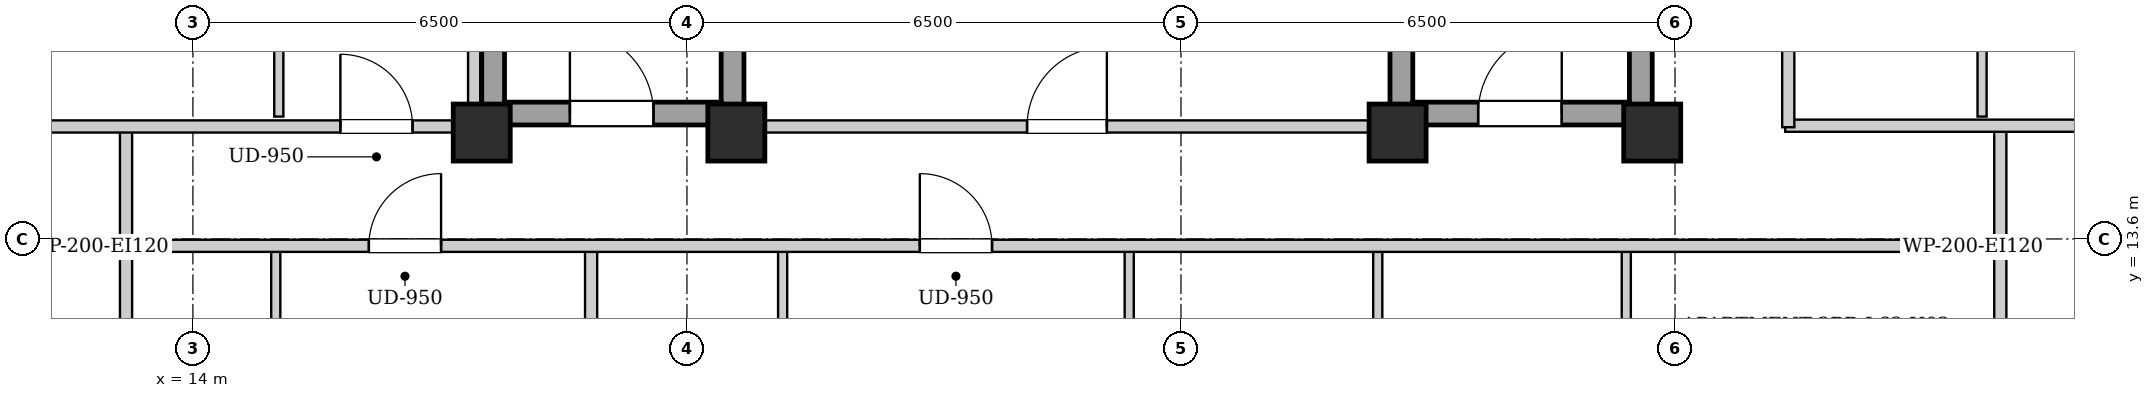
"""IFC4 building model, lengths in metres.
Left out: names, types, materials, properties, quantities, classifications, styles, units other than length and angle.
Written with IfcOpenShell. Run it as: python <this file> out.ifc"""

import sys

from ifc_helpers import new_model, si_unit, direction, frame, frame_2d, origin, origin_2d, place, context, subcontext, project, spatial, rectangle, extrude, element, fill, save


model = new_model("IFC4")
c1 = context("Model", 3, precision=1e-05, world=origin(), true_north=direction((0.0, 1.0)))
c2 = subcontext(c1, "Body", "Model", "MODEL_VIEW")
j1 = project(units=[si_unit("LENGTHUNIT", "METRE"), si_unit("PLANEANGLEUNIT", "RADIAN")], contexts=[c1])
p1 = place(None, origin())
s1 = spatial("IfcSite", under=j1, at=p1, CompositionType="ELEMENT")
p2 = place(p1, origin())
s2 = spatial("IfcBuilding", under=s1, at=p2, CompositionType="ELEMENT")
p3 = place(p2, frame((0.0, 0.0, 217.3)))
s3 = spatial("IfcBuildingStorey", under=s2, at=p3, CompositionType="ELEMENT", Elevation=217.3)
for number, where, z_axis, x_axis in (
    (1, (17.8, 15.0, 0.0), (0.0, 0.0, 1.0), (1.0, 0.0, 0.0)),
    (2, (21.15, 15.0, 0.0), (0.0, 0.0, 1.0), (1.0, 0.0, 0.0)),
    (3, (29.85, 15.0, 0.0), (0.0, 0.0, 1.0), (1.0, 0.0, 0.0)),
    (4, (33.2, 15.0, 0.0), (0.0, 0.0, 1.0), (1.0, 0.0, 0.0)),
):
    element("IfcColumn", number, at=place(p3, frame(where, z_axis=z_axis, x_axis=x_axis)), inside=s3, PredefinedType="COLUMN", context=c2, shape_type="SweptSolid", body=[
        extrude(rectangle(XDim=0.75, YDim=0.75, at=origin_2d()), origin(), (0.0, 0.0, 1.0), 3.4),
    ])
for number, where, z_axis, x_axis in (
    (5, (17.95, 15.1, 0.0), (0.0, 0.0, 1.0), (0.0, 1.0, 0.0)),
    (6, (21.1, 15.1, 0.0), (0.0, 0.0, 1.0), (0.0, 1.0, 0.0)),
):
    element("IfcWall", number, at=place(p3, frame(where, z_axis=z_axis, x_axis=x_axis)), inside=s3, PredefinedType="SHEAR", context=c2, shape_type="SweptSolid", body=[
        extrude(rectangle(XDim=9.0, YDim=0.3, at=frame_2d((4.5, 0.0))), origin(), (0.0, 0.0, 1.0), 3.14),
    ])
p4 = place(p3, frame((18.1, 15.25, 0.0), z_axis=(0.0, 0.0, 1.0), x_axis=(1.0, 0.0, 0.0)))
e7 = element("IfcWall", 7, at=p4, inside=s3, PredefinedType="SHEAR", context=c2, shape_type="SweptSolid", body=[
    extrude(rectangle(XDim=2.85, YDim=0.3, at=frame_2d((1.425, 0.0))), origin(), (0.0, 0.0, 1.0), 3.14),
])
p5 = place(p4, frame((0.86, 0.0, 0.0)))
e8 = element("IfcOpeningElement", 8, at=p5, cuts=e7, PredefinedType="OPENING", context=c2, shape_type="SweptSolid", body=[
    extrude(rectangle(XDim=1.1, YDim=2.05, at=frame_2d((0.55, 1.025))), frame((0.0, 0.16, 0.0), z_axis=(0.0, -1.0, 0.0), x_axis=(1.0, 0.0, 0.0)), (0.0, 0.0, 1.0), 0.32),
])
for number, where, z_axis, x_axis in (
    (9, (29.9, 15.1, 0.0), (0.0, 0.0, 1.0), (0.0, 1.0, 0.0)),
    (10, (33.05, 15.1, 0.0), (0.0, 0.0, 1.0), (0.0, 1.0, 0.0)),
):
    element("IfcWall", number, at=place(p3, frame(where, z_axis=z_axis, x_axis=x_axis)), inside=s3, PredefinedType="SHEAR", context=c2, shape_type="SweptSolid", body=[
        extrude(rectangle(XDim=9.0, YDim=0.3, at=frame_2d((4.5, 0.0))), origin(), (0.0, 0.0, 1.0), 3.14),
    ])
p6 = place(p3, frame((30.05, 15.25, 0.0), z_axis=(0.0, 0.0, 1.0), x_axis=(1.0, 0.0, 0.0)))
e11 = element("IfcWall", 11, at=p6, inside=s3, PredefinedType="SHEAR", context=c2, shape_type="SweptSolid", body=[
    extrude(rectangle(XDim=2.85, YDim=0.3, at=frame_2d((1.425, 0.0))), origin(), (0.0, 0.0, 1.0), 3.14),
])
p7 = place(p6, frame((0.86, 0.0, 0.0)))
e12 = element("IfcOpeningElement", 12, at=p7, cuts=e11, PredefinedType="OPENING", context=c2, shape_type="SweptSolid", body=[
    extrude(rectangle(XDim=1.1, YDim=2.05, at=frame_2d((0.55, 1.025))), frame((0.0, 0.16, 0.0), z_axis=(0.0, -1.0, 0.0), x_axis=(1.0, 0.0, 0.0)), (0.0, 0.0, 1.0), 0.32),
])
p8 = place(p3, frame((21.25, 15.08, 0.0), z_axis=(0.0, 0.0, 1.0), x_axis=(1.0, 0.0, 0.0)))
e13 = element("IfcWall", 13, at=p8, inside=s3, PredefinedType="PARTITIONING", context=c2, shape_type="SweptSolid", body=[
    extrude(rectangle(XDim=8.5, YDim=0.16, at=frame_2d((4.25, 0.0))), origin(), (0.0, 0.0, 1.0), 2.668),
])
p9 = place(p8, frame((3.725, 0.0, 0.0)))
e14 = element("IfcOpeningElement", 14, at=p9, cuts=e13, PredefinedType="OPENING", context=c2, shape_type="SweptSolid", body=[
    extrude(rectangle(XDim=1.05, YDim=2.05, at=frame_2d((0.525, 1.025))), frame((0.0, 0.09, 0.0), z_axis=(0.0, -1.0, 0.0), x_axis=(1.0, 0.0, 0.0)), (0.0, 0.0, 1.0), 0.18),
])
for number, where, z_axis, x_axis in (
    (15, (13.12, 13.51, 0.0), (0.0, 0.0, 1.0), (0.0, 1.0, 0.0)),
    (16, (37.78, 13.51, 0.0), (0.0, 0.0, 1.0), (0.0, 1.0, 0.0)),
):
    element("IfcWall", number, at=place(p3, frame(where, z_axis=z_axis, x_axis=x_axis)), inside=s3, PredefinedType="PARTITIONING", context=c2, shape_type="SweptSolid", body=[
        extrude(rectangle(XDim=1.58, YDim=0.16, at=frame_2d((0.79, 0.0))), origin(), (0.0, 0.0, 1.0), 3.14),
    ])
p10 = place(p3, frame((34.95, 15.09, 0.0), z_axis=(0.0, 0.0, 1.0), x_axis=(1.0, 0.0, 0.0)))
e17 = element("IfcWall", 17, at=p10, inside=s3, PredefinedType="PARTITIONING", context=c2, shape_type="SweptSolid", body=[
    extrude(rectangle(XDim=5.07, YDim=0.16, at=frame_2d((2.535, 0.0))), origin(), (0.0, 0.0, 1.0), 2.668),
])
p11 = place(p3, frame((13.12, 10.56, 0.0), z_axis=(0.0, 0.0, 1.0), x_axis=(0.0, 1.0, 0.0)))
e18 = element("IfcWall", 18, at=p11, inside=s3, PredefinedType="PARTITIONING", context=c2, shape_type="SweptSolid", body=[
    extrude(rectangle(XDim=2.91, YDim=0.16, at=frame_2d((1.455, 0.0))), origin(), (0.0, 0.0, 1.0), 3.14),
])
p12 = place(p3, frame((15.09, 10.62, 0.0), z_axis=(0.0, 0.0, 1.0), x_axis=(0.0, 1.0, 0.0)))
e19 = element("IfcWall", 19, at=p12, inside=s3, PredefinedType="PARTITIONING", context=c2, shape_type="SweptSolid", body=[
    extrude(rectangle(XDim=2.85, YDim=0.12, at=frame_2d((1.425, 0.0))), origin(), (0.0, 0.0, 1.0), 3.14),
])
p13 = place(p12, frame((0.995, 0.0, 0.0)))
e20 = element("IfcOpeningElement", 20, at=p13, cuts=e19, PredefinedType="OPENING", context=c2, shape_type="SweptSolid", body=[
    extrude(rectangle(XDim=0.86, YDim=2.05, at=frame_2d((0.43, 1.025))), frame((0.0, 0.07, 0.0), z_axis=(0.0, -1.0, 0.0), x_axis=(1.0, 0.0, 0.0)), (0.0, 0.0, 1.0), 0.14),
])
p14 = place(p3, frame((37.78, 10.56, 0.0), z_axis=(0.0, 0.0, 1.0), x_axis=(0.0, 1.0, 0.0)))
e21 = element("IfcWall", 21, at=p14, inside=s3, PredefinedType="PARTITIONING", context=c2, shape_type="SweptSolid", body=[
    extrude(rectangle(XDim=2.91, YDim=0.16, at=frame_2d((1.455, 0.0))), origin(), (0.0, 0.0, 1.0), 3.14),
])
p15 = place(p3, frame((19.239, 6.06, 0.0), z_axis=(0.0, 0.0, 1.0), x_axis=(0.0, 1.0, 0.0)))
e22 = element("IfcWall", 22, at=p15, inside=s3, PredefinedType="PARTITIONING", context=c2, shape_type="SweptSolid", body=[
    extrude(rectangle(XDim=7.41, YDim=0.16, at=frame_2d((3.705, 0.0))), origin(), (0.0, 0.0, 1.0), 3.14),
])
p16 = place(p3, frame((21.759, 10.62, 0.0), z_axis=(0.0, 0.0, 1.0), x_axis=(0.0, 1.0, 0.0)))
e23 = element("IfcWall", 23, at=p16, inside=s3, PredefinedType="PARTITIONING", context=c2, shape_type="SweptSolid", body=[
    extrude(rectangle(XDim=2.85, YDim=0.12, at=frame_2d((1.425, 0.0))), origin(), (0.0, 0.0, 1.0), 3.14),
])
p17 = place(p16, frame((0.995, 0.0, 0.0)))
e24 = element("IfcOpeningElement", 24, at=p17, cuts=e23, PredefinedType="OPENING", context=c2, shape_type="SweptSolid", body=[
    extrude(rectangle(XDim=0.86, YDim=2.05, at=frame_2d((0.43, 1.025))), frame((0.0, 0.07, 0.0), z_axis=(0.0, -1.0, 0.0), x_axis=(1.0, 0.0, 0.0)), (0.0, 0.0, 1.0), 0.14),
])
p18 = place(p3, frame((26.319, 10.62, 0.0), z_axis=(0.0, 0.0, 1.0), x_axis=(0.0, 1.0, 0.0)))
e25 = element("IfcWall", 25, at=p18, inside=s3, PredefinedType="PARTITIONING", context=c2, shape_type="SweptSolid", body=[
    extrude(rectangle(XDim=2.85, YDim=0.12, at=frame_2d((1.425, 0.0))), origin(), (0.0, 0.0, 1.0), 3.14),
])
p19 = place(p18, frame((0.975, 0.0, 0.0)))
e26 = element("IfcOpeningElement", 26, at=p19, cuts=e25, PredefinedType="OPENING", context=c2, shape_type="SweptSolid", body=[
    extrude(rectangle(XDim=0.9, YDim=2.05, at=frame_2d((0.45, 1.025))), frame((0.0, 0.07, 0.0), z_axis=(0.0, -1.0, 0.0), x_axis=(1.0, 0.0, 0.0)), (0.0, 0.0, 1.0), 0.14),
])
p20 = place(p3, frame((29.589, 10.62, 0.0), z_axis=(0.0, 0.0, 1.0), x_axis=(0.0, 1.0, 0.0)))
e27 = element("IfcWall", 27, at=p20, inside=s3, PredefinedType="PARTITIONING", context=c2, shape_type="SweptSolid", body=[
    extrude(rectangle(XDim=2.85, YDim=0.12, at=frame_2d((1.425, 0.0))), origin(), (0.0, 0.0, 1.0), 3.14),
])
p21 = place(p20, frame((0.975, 0.0, 0.0)))
e28 = element("IfcOpeningElement", 28, at=p21, cuts=e27, PredefinedType="OPENING", context=c2, shape_type="SweptSolid", body=[
    extrude(rectangle(XDim=0.9, YDim=2.05, at=frame_2d((0.45, 1.025))), frame((0.0, 0.07, 0.0), z_axis=(0.0, -1.0, 0.0), x_axis=(1.0, 0.0, 0.0)), (0.0, 0.0, 1.0), 0.14),
])
p22 = place(p3, frame((32.859, 10.62, 0.0), z_axis=(0.0, 0.0, 1.0), x_axis=(0.0, 1.0, 0.0)))
e29 = element("IfcWall", 29, at=p22, inside=s3, PredefinedType="PARTITIONING", context=c2, shape_type="SweptSolid", body=[
    extrude(rectangle(XDim=2.85, YDim=0.12, at=frame_2d((1.425, 0.0))), origin(), (0.0, 0.0, 1.0), 3.14),
])
p23 = place(p22, frame((0.975, 0.0, 0.0)))
e30 = element("IfcOpeningElement", 30, at=p23, cuts=e29, PredefinedType="OPENING", context=c2, shape_type="SweptSolid", body=[
    extrude(rectangle(XDim=0.9, YDim=2.05, at=frame_2d((0.45, 1.025))), frame((0.0, 0.07, 0.0), z_axis=(0.0, -1.0, 0.0), x_axis=(1.0, 0.0, 0.0)), (0.0, 0.0, 1.0), 0.14),
])
p24 = place(p3, frame((10.88, 15.08, 0.0), z_axis=(0.0, 0.0, 1.0), x_axis=(1.0, 0.0, 0.0)))
e31 = element("IfcWall", 31, at=p24, inside=s3, PredefinedType="PARTITIONING", context=c2, shape_type="SweptSolid", body=[
    extrude(rectangle(XDim=6.88, YDim=0.16, at=frame_2d((3.44, 0.0))), origin(), (0.0, 0.0, 1.0), 2.668),
])
p25 = place(p24, frame((5.06, 0.0, 0.0)))
e32 = element("IfcOpeningElement", 32, at=p25, cuts=e31, PredefinedType="OPENING", context=c2, shape_type="SweptSolid", body=[
    extrude(rectangle(XDim=0.95, YDim=2.1, at=frame_2d((0.475, 1.05))), frame((0.0, 0.09, 0.0), z_axis=(0.0, -1.0, 0.0), x_axis=(1.0, 0.0, 0.0)), (0.0, 0.0, 1.0), 0.18),
])
p26 = place(p3, frame((15.13, 15.21, 0.0), z_axis=(0.0, 0.0, 1.0), x_axis=(0.0, 1.0, 0.0)))
e33 = element("IfcWall", 33, at=p26, inside=s3, PredefinedType="PARTITIONING", context=c2, shape_type="SweptSolid", body=[
    extrude(rectangle(XDim=4.308, YDim=0.12, at=frame_2d((2.154, 0.0))), origin(), (0.0, 0.0, 1.0), 3.14),
])
p27 = place(p26, frame((1.704, 0.0, 0.0)))
e34 = element("IfcOpeningElement", 34, at=p27, cuts=e33, PredefinedType="OPENING", context=c2, shape_type="SweptSolid", body=[
    extrude(rectangle(XDim=0.9, YDim=2.05, at=frame_2d((0.45, 1.025))), frame((0.0, 0.07, 0.0), z_axis=(0.0, -1.0, 0.0), x_axis=(1.0, 0.0, 0.0)), (0.0, 0.0, 1.0), 0.14),
])
p28 = place(p3, frame((37.54, 15.21, 0.0), z_axis=(0.0, 0.0, 1.0), x_axis=(0.0, 1.0, 0.0)))
e35 = element("IfcWall", 35, at=p28, inside=s3, PredefinedType="PARTITIONING", context=c2, shape_type="SweptSolid", body=[
    extrude(rectangle(XDim=2.159, YDim=0.12, at=frame_2d((1.08, 0.0))), origin(), (0.0, 0.0, 1.0), 3.14),
])
p29 = place(p3, frame((13.15, 13.51, 0.0), z_axis=(0.0, 0.0, 1.0), x_axis=(1.0, 0.0, 0.0)))
e36 = element("IfcWall", 36, at=p29, inside=s3, PredefinedType="PARTITIONING", context=c2, shape_type="SweptSolid", body=[
    extrude(rectangle(XDim=24.6, YDim=0.16, at=frame_2d((12.3, 0.0))), origin(), (0.0, 0.0, 1.0), 3.14),
])
p30 = place(p29, frame((3.165, 0.0, 0.0)))
e37 = element("IfcOpeningElement", 37, at=p30, cuts=e36, PredefinedType="OPENING", context=c2, shape_type="SweptSolid", body=[
    extrude(rectangle(XDim=0.95, YDim=2.1, at=frame_2d((0.475, 1.05))), frame((0.0, 0.09, 0.0), z_axis=(0.0, -1.0, 0.0), x_axis=(1.0, 0.0, 0.0)), (0.0, 0.0, 1.0), 0.18),
])
p31 = place(p29, frame((10.414, 0.0, 0.0)))
e38 = element("IfcOpeningElement", 38, at=p31, cuts=e36, PredefinedType="OPENING", context=c2, shape_type="SweptSolid", body=[
    extrude(rectangle(XDim=0.95, YDim=2.1, at=frame_2d((0.475, 1.05))), frame((0.0, 0.09, 0.0), z_axis=(0.0, -1.0, 0.0), x_axis=(1.0, 0.0, 0.0)), (0.0, 0.0, 1.0), 0.18),
])
p32 = place(p3, frame((17.7, 15.02, 0.0), z_axis=(0.0, 0.0, 1.0), x_axis=(0.0, 1.0, 0.0)))
e39 = element("IfcWall", 39, at=p32, inside=s3, PredefinedType="PARTITIONING", context=c2, shape_type="SweptSolid", body=[
    extrude(rectangle(XDim=13.98, YDim=0.16, at=frame_2d((6.99, 0.0))), origin(), (0.0, 0.0, 1.0), 2.475),
])
p33 = place(p3, frame((34.99, 15.07, 0.0), z_axis=(0.0, 0.0, 1.0), x_axis=(0.0, 1.0, 0.0)))
e40 = element("IfcWall", 40, at=p33, inside=s3, PredefinedType="PARTITIONING", context=c2, shape_type="SweptSolid", body=[
    extrude(rectangle(XDim=13.93, YDim=0.16, at=frame_2d((6.965, 0.0))), origin(), (0.0, 0.0, 1.0), 3.14),
])
p34 = place(p33, frame((4.661, 0.0, 0.0)))
e41 = element("IfcOpeningElement", 41, at=p34, cuts=e40, PredefinedType="OPENING", context=c2, shape_type="SweptSolid", body=[
    extrude(rectangle(XDim=0.95, YDim=2.1, at=frame_2d((0.475, 1.05))), frame((0.0, 0.09, 0.0), z_axis=(0.0, -1.0, 0.0), x_axis=(1.0, 0.0, 0.0)), (0.0, 0.0, 1.0), 0.18),
])
p35 = place(p33, frame((11.411, 0.0, 0.0)))
e42 = element("IfcOpeningElement", 42, at=p35, cuts=e40, PredefinedType="OPENING", context=c2, shape_type="SweptSolid", body=[
    extrude(rectangle(XDim=0.95, YDim=2.1, at=frame_2d((0.475, 1.05))), frame((0.0, 0.09, 0.0), z_axis=(0.0, -1.0, 0.0), x_axis=(1.0, 0.0, 0.0)), (0.0, 0.0, 1.0), 0.18),
])
p36 = place(p5, origin())
e43 = element("IfcDoor", 43, at=p36, inside=s3, OperationType="SINGLE_SWING_LEFT", PredefinedType="DOOR", context=c2, shape_type="SweptSolid", body=[
    extrude(rectangle(XDim=1.1, YDim=2.05, at=frame_2d((0.55, 1.025))), frame((0.0, 0.025, 0.0), z_axis=(0.0, -1.0, 0.0), x_axis=(1.0, 0.0, 0.0)), (0.0, 0.0, 1.0), 0.05),
])
fill(e8, e43)
p37 = place(p7, origin())
e44 = element("IfcDoor", 44, at=p37, inside=s3, OperationType="SINGLE_SWING_RIGHT", PredefinedType="DOOR", context=c2, shape_type="SweptSolid", body=[
    extrude(rectangle(XDim=1.1, YDim=2.05, at=frame_2d((0.55, 1.025))), frame((0.0, 0.025, 0.0), z_axis=(0.0, -1.0, 0.0), x_axis=(1.0, 0.0, 0.0)), (0.0, 0.0, 1.0), 0.05),
])
fill(e12, e44)
p38 = place(p9, origin())
e45 = element("IfcDoor", 45, at=p38, inside=s3, OperationType="SINGLE_SWING_RIGHT", PredefinedType="DOOR", context=c2, shape_type="SweptSolid", body=[
    extrude(rectangle(XDim=1.05, YDim=2.05, at=frame_2d((0.525, 1.025))), frame((0.0, 0.025, 0.0), z_axis=(0.0, -1.0, 0.0), x_axis=(1.0, 0.0, 0.0)), (0.0, 0.0, 1.0), 0.05),
])
fill(e14, e45)
p39 = place(p25, origin())
e46 = element("IfcDoor", 46, at=p39, inside=s3, OperationType="SINGLE_SWING_LEFT", PredefinedType="DOOR", context=c2, shape_type="SweptSolid", body=[
    extrude(rectangle(XDim=0.95, YDim=2.1, at=frame_2d((0.475, 1.05))), frame((0.0, 0.025, 0.0), z_axis=(0.0, -1.0, 0.0), x_axis=(1.0, 0.0, 0.0)), (0.0, 0.0, 1.0), 0.05),
])
fill(e32, e46)
p40 = place(p30, origin())
e47 = element("IfcDoor", 47, at=p40, inside=s3, OperationType="SINGLE_SWING_RIGHT", PredefinedType="DOOR", context=c2, shape_type="SweptSolid", body=[
    extrude(rectangle(XDim=0.95, YDim=2.1, at=frame_2d((0.475, 1.05))), frame((0.0, 0.025, 0.0), z_axis=(0.0, -1.0, 0.0), x_axis=(1.0, 0.0, 0.0)), (0.0, 0.0, 1.0), 0.05),
])
fill(e37, e47)
p41 = place(p31, origin())
e48 = element("IfcDoor", 48, at=p41, inside=s3, OperationType="SINGLE_SWING_LEFT", PredefinedType="DOOR", context=c2, shape_type="SweptSolid", body=[
    extrude(rectangle(XDim=0.95, YDim=2.1, at=frame_2d((0.475, 1.05))), frame((0.0, 0.025, 0.0), z_axis=(0.0, -1.0, 0.0), x_axis=(1.0, 0.0, 0.0)), (0.0, 0.0, 1.0), 0.05),
])
fill(e38, e48)
save(model, sys.argv[1])
